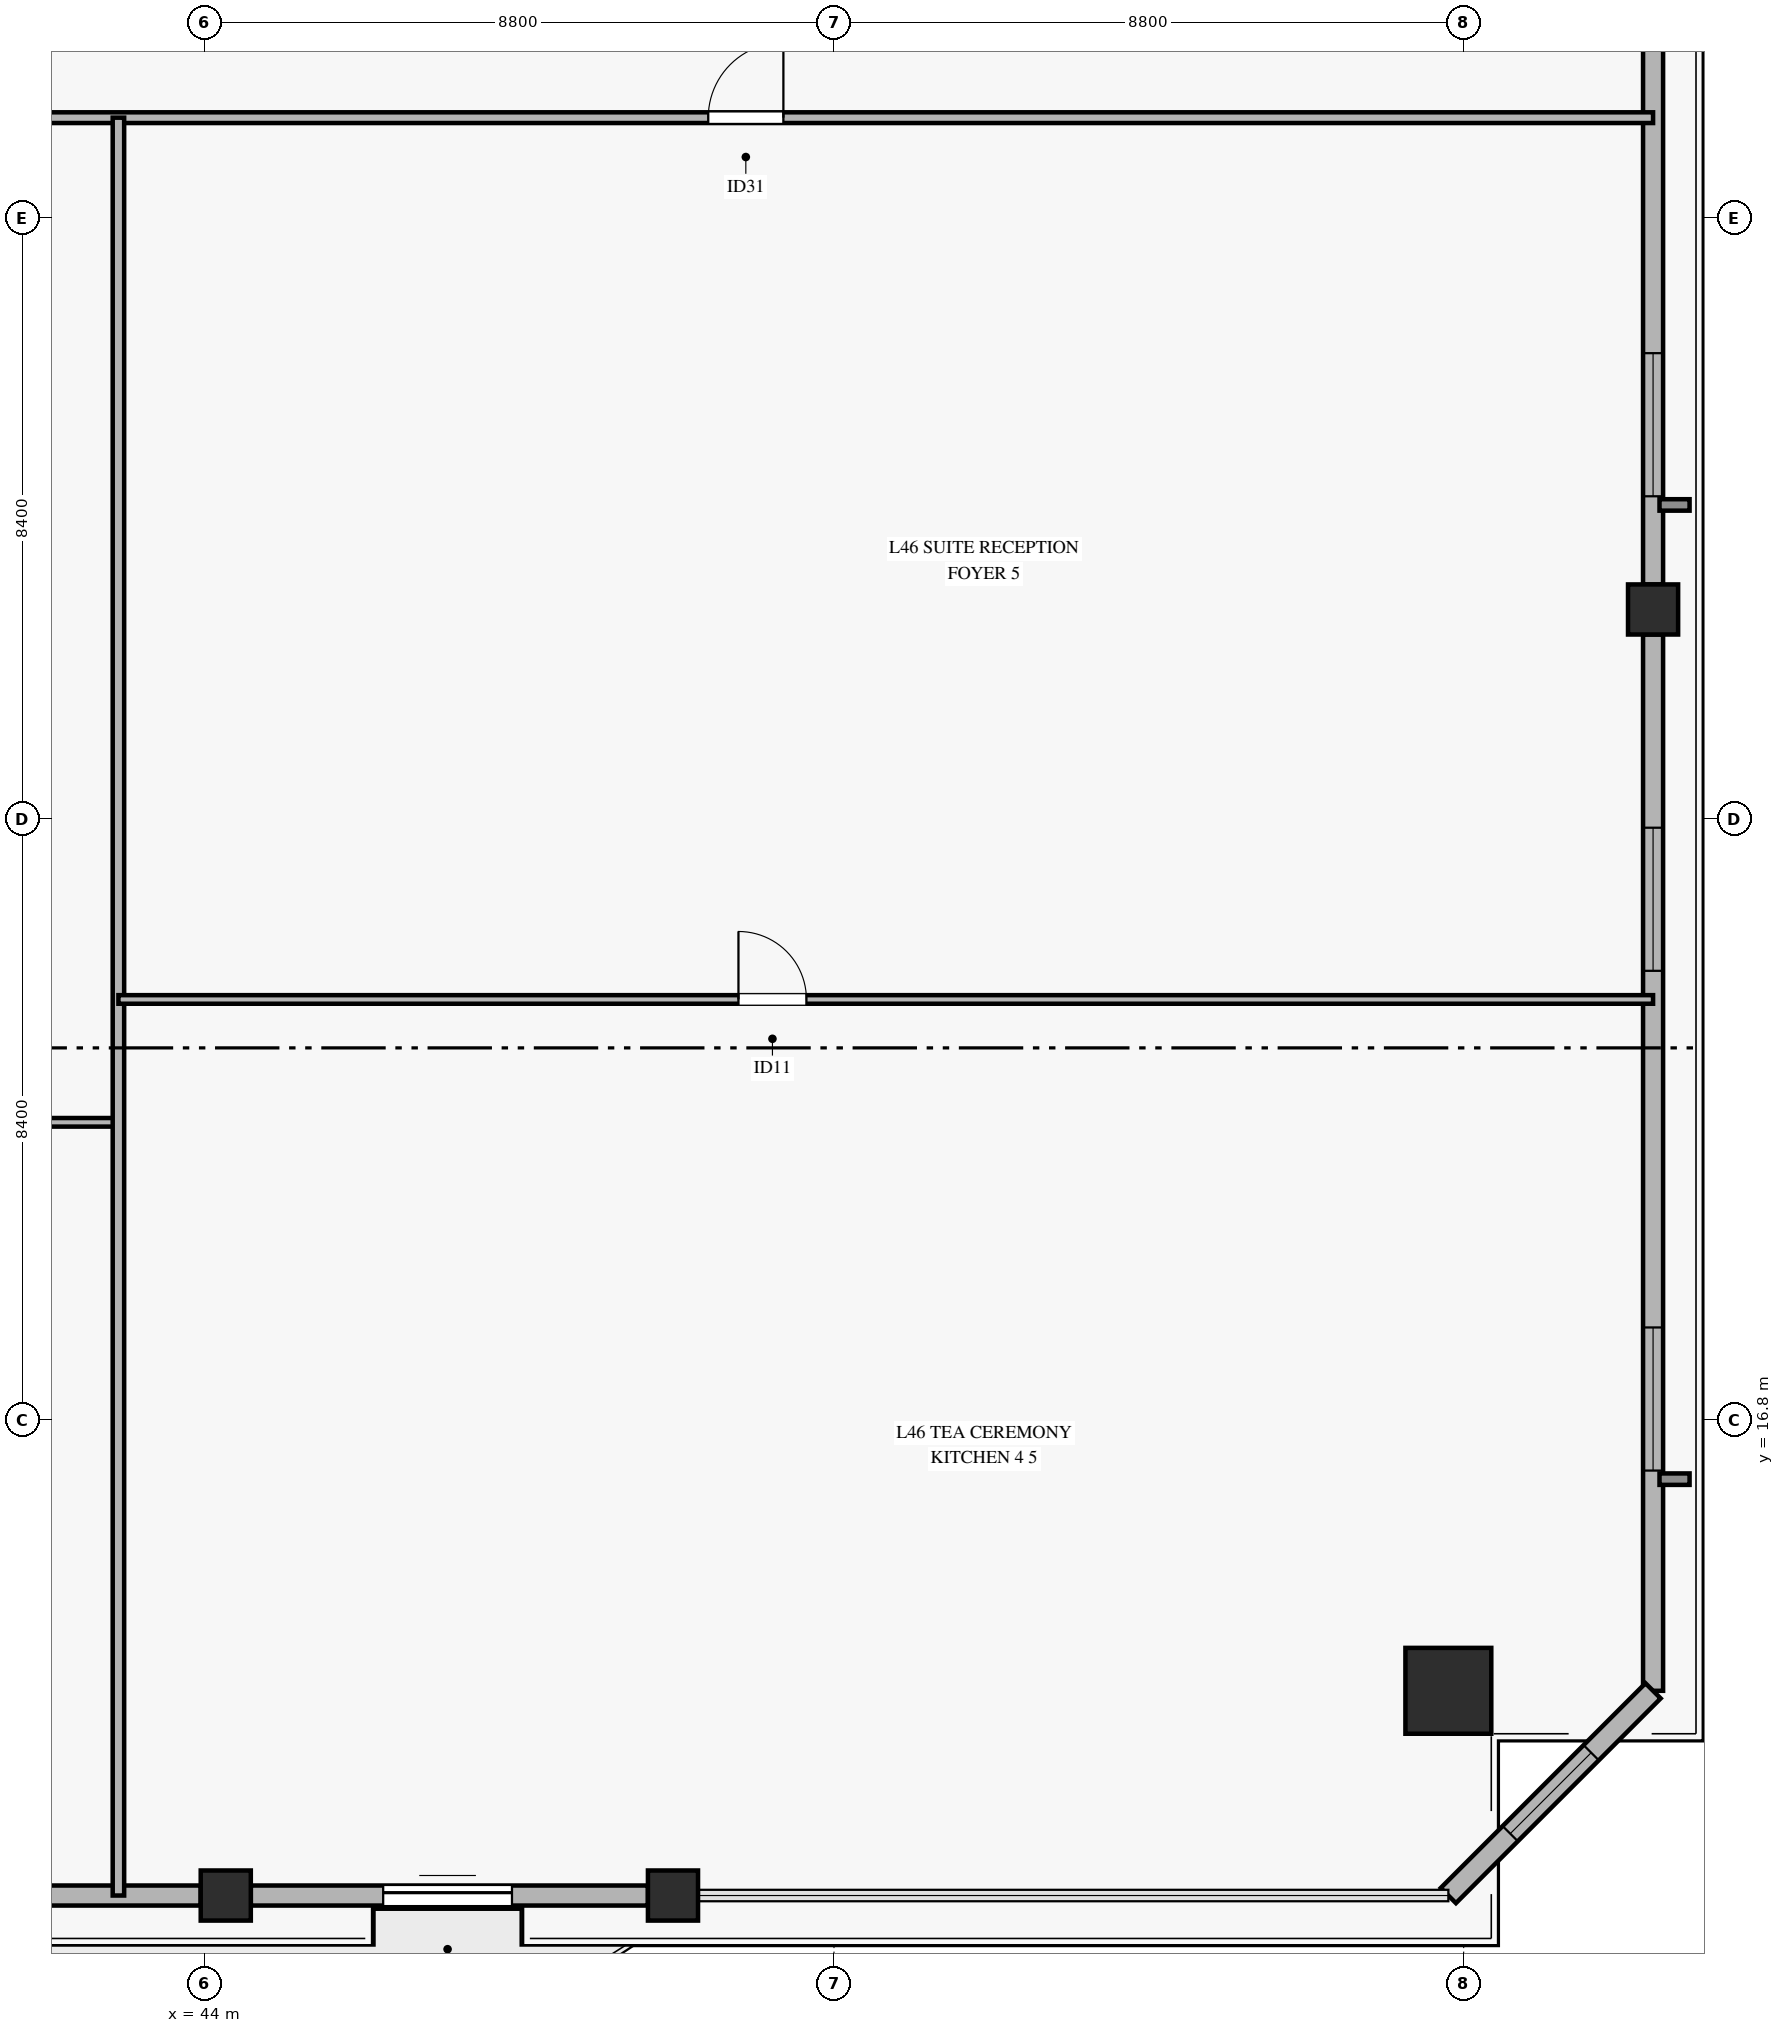
"""IFC4 building model, lengths in metres.
Left out: names, types, materials, properties, quantities, classifications, styles, units other than length and angle.
Written with IfcOpenShell. Run it as: python <this file> out.ifc"""

import sys

from ifc_helpers import new_model, si_unit, direction, frame, frame_2d, origin, origin_2d, place, context, subcontext, project, spatial, rectangle, hollow_rectangle, extrude, source, transform, mapped, element, fill, save


model = new_model("IFC4")
c1 = context("Model", 3, precision=1e-05, world=origin(), true_north=direction((0.0, 1.0)))
c2 = subcontext(c1, "Body", "Model", "MODEL_VIEW")
j1 = project(units=[si_unit("LENGTHUNIT", "METRE"), si_unit("PLANEANGLEUNIT", "RADIAN")], contexts=[c1])
p1 = place(None, origin())
s1 = spatial("IfcSite", under=j1, at=p1, CompositionType="ELEMENT")
p2 = place(p1, origin())
s2 = spatial("IfcBuilding", under=s1, at=p2, CompositionType="ELEMENT")
p3 = place(p2, frame((0.0, 0.0, 184.2)))
s3 = spatial("IfcBuildingStorey", under=s2, at=p3, CompositionType="ELEMENT", Elevation=184.2)
m1 = source(origin(), c2, "Body", "SweptSolid", [
    extrude(hollow_rectangle(XDim=1.2, YDim=1.2, WallThickness=0.055, at=origin_2d()), origin(), (0.0, 0.0, 1.0), 3.27),
])
p4 = place(p3, frame((61.386, 13.015, 0.0), z_axis=(0.0, 0.0, 1.0), x_axis=(1.0, 0.0, 0.0)))
e1 = element("IfcColumn", 1, at=p4, inside=s3, PredefinedType="COLUMN", context=c2, shape_type="MappedRepresentation", body=[
    mapped(m1, transform((0.0, 0.0, 0.0), x_axis=(1.0, 0.0, 0.0), y_axis=(0.0, 1.0, 0.0), z_axis=(0.0, 0.0, 1.0), scale=1.0)),
])
m2 = source(origin(), c2, "Body", "SweptSolid", [
    extrude(hollow_rectangle(XDim=0.7, YDim=0.7, WallThickness=0.032, at=origin_2d()), origin(), (0.0, 0.0, 1.0), 3.27),
])
for number, where, z_axis, x_axis in (
    (2, (44.3, 10.154, 0.0), (0.0, 0.0, 1.0), (1.0, 0.0, 0.0)),
    (3, (50.55, 10.154, 0.0), (0.0, 0.0, 1.0), (1.0, 0.0, 0.0)),
    (4, (64.247, 28.127, 0.0), (0.0, 0.0, 1.0), (1.0, 0.0, 0.0)),
):
    element("IfcColumn", number, at=place(p3, frame(where, z_axis=z_axis, x_axis=x_axis)), inside=s3, PredefinedType="COLUMN", context=c2, shape_type="MappedRepresentation", body=[
        mapped(m2, transform((0.0, 0.0, 0.0), x_axis=(1.0, 0.0, 0.0), y_axis=(0.0, 1.0, 0.0), z_axis=(0.0, 0.0, 1.0), scale=1.0)),
    ])
p5 = place(p3, frame((37.9, 10.154, 0.0), z_axis=(0.0, 0.0, 1.0), x_axis=(1.0, 0.0, 0.0)))
e5 = element("IfcWall", 5, at=p5, inside=s3, PredefinedType="SOLIDWALL", context=c2, shape_type="SweptSolid", body=[
    extrude(rectangle(XDim=6.05, YDim=0.28, at=frame_2d((3.025, 0.0))), origin(), (0.0, 0.0, 1.0), 2.75),
])
p6 = place(p3, frame((44.65, 10.154, 0.0), z_axis=(0.0, 0.0, 1.0), x_axis=(1.0, 0.0, 0.0)))
e6 = element("IfcWall", 6, at=p6, inside=s3, PredefinedType="SOLIDWALL", context=c2, shape_type="SweptSolid", body=[
    extrude(rectangle(XDim=5.55, YDim=0.28, at=frame_2d((2.775, 0.0))), origin(), (0.0, 0.0, 1.0), 2.75),
])
p7 = place(p6, frame((1.85, 0.0, 0.0)))
e7 = element("IfcOpeningElement", 7, at=p7, cuts=e6, PredefinedType="OPENING", context=c2, shape_type="SweptSolid", body=[
    extrude(rectangle(XDim=1.8, YDim=2.25, at=frame_2d((0.9, 1.125))), frame((0.0, 0.15, 0.0), z_axis=(0.0, -1.0, 0.0), x_axis=(1.0, 0.0, 0.0)), (0.0, 0.0, 1.0), 0.3),
])
p8 = place(p3, frame((64.247, 13.015, 0.0), z_axis=(0.0, 0.0, 1.0), x_axis=(0.0, 1.0, 0.0)))
e8 = element("IfcWall", 8, at=p8, inside=s3, PredefinedType="SOLIDWALL", context=c2, shape_type="SweptSolid", body=[
    extrude(rectangle(XDim=14.762, YDim=0.28, at=frame_2d((7.381, 0.0))), origin(), (0.0, 0.0, 1.0), 2.75),
])
p9 = place(p8, frame((3.078, 0.0, 0.45)))
e9 = element("IfcOpeningElement", 9, at=p9, cuts=e8, PredefinedType="OPENING", context=c2, shape_type="SweptSolid", body=[
    extrude(rectangle(XDim=2.0, YDim=2.0, at=frame_2d((1.0, 1.0))), frame((0.0, 0.15, 0.0), z_axis=(0.0, -1.0, 0.0), x_axis=(1.0, 0.0, 0.0)), (0.0, 0.0, 1.0), 0.3),
])
p10 = place(p8, frame((10.062, 0.0, 0.45)))
e10 = element("IfcOpeningElement", 10, at=p10, cuts=e8, PredefinedType="OPENING", context=c2, shape_type="SweptSolid", body=[
    extrude(rectangle(XDim=2.0, YDim=2.0, at=frame_2d((1.0, 1.0))), frame((0.0, 0.15, 0.0), z_axis=(0.0, -1.0, 0.0), x_axis=(1.0, 0.0, 0.0)), (0.0, 0.0, 1.0), 0.3),
])
p11 = place(p3, frame((64.247, 28.477, 0.0), z_axis=(0.0, 0.0, 1.0), x_axis=(0.0, 1.0, 0.0)))
e11 = element("IfcWall", 11, at=p11, inside=s3, PredefinedType="SOLIDWALL", context=c2, shape_type="SweptSolid", body=[
    extrude(rectangle(XDim=14.762, YDim=0.28, at=frame_2d((7.381, 0.0))), origin(), (0.0, 0.0, 1.0), 2.75),
])
p12 = place(p11, frame((1.232, 0.0, 0.45)))
e12 = element("IfcOpeningElement", 12, at=p12, cuts=e11, PredefinedType="OPENING", context=c2, shape_type="SweptSolid", body=[
    extrude(rectangle(XDim=2.0, YDim=2.0, at=frame_2d((1.0, 1.0))), frame((0.0, 0.15, 0.0), z_axis=(0.0, -1.0, 0.0), x_axis=(1.0, 0.0, 0.0)), (0.0, 0.0, 1.0), 0.3),
])
p13 = place(p11, frame((11.487, 0.0, 0.45)))
e13 = element("IfcOpeningElement", 13, at=p13, cuts=e11, PredefinedType="OPENING", context=c2, shape_type="SweptSolid", body=[
    extrude(rectangle(XDim=2.0, YDim=2.0, at=frame_2d((1.0, 1.0))), frame((0.0, 0.15, 0.0), z_axis=(0.0, -1.0, 0.0), x_axis=(1.0, 0.0, 0.0)), (0.0, 0.0, 1.0), 0.3),
])
p14 = place(p3, frame((61.386, 10.154, 0.0), z_axis=(0.0, 0.0, 1.0), x_axis=(0.707136951076, 0.70707661001, 0.0)))
e14 = element("IfcWall", 14, at=p14, inside=s3, PredefinedType="SOLIDWALL", context=c2, shape_type="SweptSolid", body=[
    extrude(rectangle(XDim=4.046, YDim=0.3, at=frame_2d((2.023, 0.0))), origin(), (0.0, 0.0, 1.0), 2.75),
])
p15 = place(p14, frame((1.223, 0.0, 0.45)))
e15 = element("IfcOpeningElement", 15, at=p15, cuts=e14, PredefinedType="OPENING", context=c2, shape_type="SweptSolid", body=[
    extrude(rectangle(XDim=1.6, YDim=2.0, at=frame_2d((0.8, 1.0))), frame((0.0, 0.16, 0.0), z_axis=(0.0, -1.0, 0.0), x_axis=(1.0, 0.0, 0.0)), (0.0, 0.0, 1.0), 0.32),
])
p16 = place(p3, frame((6.154, 35.0, 0.0), z_axis=(0.0, 0.0, 1.0), x_axis=(1.0, 0.0, 0.0)))
e16 = element("IfcWall", 16, at=p16, inside=s3, PredefinedType="PARTITIONING", context=c2, shape_type="SweptSolid", body=[
    extrude(rectangle(XDim=58.093, YDim=0.15, at=frame_2d((29.046, 0.0))), origin(), (0.0, 0.0, 1.0), 2.455),
])
p17 = place(p16, frame((6.695, 0.0, 0.0)))
e17 = element("IfcOpeningElement", 17, at=p17, cuts=e16, PredefinedType="OPENING", context=c2, shape_type="SweptSolid", body=[
    extrude(rectangle(XDim=1.05, YDim=2.15, at=frame_2d((0.525, 1.075))), frame((0.0, 0.085, 0.0), z_axis=(0.0, -1.0, 0.0), x_axis=(1.0, 0.0, 0.0)), (0.0, 0.0, 1.0), 0.17),
])
p18 = place(p16, frame((19.523, 0.0, 0.0)))
e18 = element("IfcOpeningElement", 18, at=p18, cuts=e16, PredefinedType="OPENING", context=c2, shape_type="SweptSolid", body=[
    extrude(rectangle(XDim=1.05, YDim=2.15, at=frame_2d((0.525, 1.075))), frame((0.0, 0.085, 0.0), z_axis=(0.0, -1.0, 0.0), x_axis=(1.0, 0.0, 0.0)), (0.0, 0.0, 1.0), 0.17),
])
p19 = place(p16, frame((26.123, 0.0, 0.0)))
e19 = element("IfcOpeningElement", 19, at=p19, cuts=e16, PredefinedType="OPENING", context=c2, shape_type="SweptSolid", body=[
    extrude(rectangle(XDim=1.05, YDim=2.15, at=frame_2d((0.525, 1.075))), frame((0.0, 0.085, 0.0), z_axis=(0.0, -1.0, 0.0), x_axis=(1.0, 0.0, 0.0)), (0.0, 0.0, 1.0), 0.17),
])
p20 = place(p16, frame((32.616, 0.0, 0.0)))
e20 = element("IfcOpeningElement", 20, at=p20, cuts=e16, PredefinedType="OPENING", context=c2, shape_type="SweptSolid", body=[
    extrude(rectangle(XDim=1.05, YDim=2.15, at=frame_2d((0.525, 1.075))), frame((0.0, 0.085, 0.0), z_axis=(0.0, -1.0, 0.0), x_axis=(1.0, 0.0, 0.0)), (0.0, 0.0, 1.0), 0.17),
])
p21 = place(p16, frame((44.889, 0.0, 0.0)))
e21 = element("IfcOpeningElement", 21, at=p21, cuts=e16, PredefinedType="OPENING", context=c2, shape_type="SweptSolid", body=[
    extrude(rectangle(XDim=1.05, YDim=2.15, at=frame_2d((0.525, 1.075))), frame((0.0, 0.085, 0.0), z_axis=(0.0, -1.0, 0.0), x_axis=(1.0, 0.0, 0.0)), (0.0, 0.0, 1.0), 0.17),
])
p22 = place(p3, frame((36.2, 20.96, 0.0), z_axis=(0.0, 0.0, 1.0), x_axis=(1.0, 0.0, 0.0)))
e22 = element("IfcWall", 22, at=p22, inside=s3, PredefinedType="PARTITIONING", context=c2, shape_type="SweptSolid", body=[
    extrude(rectangle(XDim=6.6, YDim=0.12, at=frame_2d((3.3, 0.0))), origin(), (0.0, 0.0, 1.0), 2.455),
])
p23 = place(p22, frame((3.025, 0.0, 0.0)))
e23 = element("IfcOpeningElement", 23, at=p23, cuts=e22, PredefinedType="OPENING", context=c2, shape_type="SweptSolid", body=[
    extrude(rectangle(XDim=0.95, YDim=2.1, at=frame_2d((0.475, 1.05))), frame((0.0, 0.07, 0.0), z_axis=(0.0, -1.0, 0.0), x_axis=(1.0, 0.0, 0.0)), (0.0, 0.0, 1.0), 0.14),
])
p24 = place(p3, frame((42.8, 10.154, 0.0), z_axis=(0.0, 0.0, 1.0), x_axis=(0.0, 1.0, 0.0)))
e24 = element("IfcWall", 24, at=p24, inside=s3, PredefinedType="PARTITIONING", context=c2, shape_type="SweptSolid", body=[
    extrude(rectangle(XDim=24.846, YDim=0.16, at=frame_2d((12.423, 0.0))), origin(), (0.0, 0.0, 1.0), 2.755),
])
p25 = place(p3, frame((42.8, 22.677, 0.0), z_axis=(0.0, 0.0, 1.0), x_axis=(1.0, 0.0, 0.0)))
e25 = element("IfcWall", 25, at=p25, inside=s3, PredefinedType="PARTITIONING", context=c2, shape_type="SweptSolid", body=[
    extrude(rectangle(XDim=21.447, YDim=0.12, at=frame_2d((10.724, 0.0))), origin(), (0.0, 0.0, 1.0), 2.455),
])
p26 = place(p25, frame((8.665, 0.0, 0.0)))
e26 = element("IfcOpeningElement", 26, at=p26, cuts=e25, PredefinedType="OPENING", context=c2, shape_type="SweptSolid", body=[
    extrude(rectangle(XDim=0.95, YDim=2.1, at=frame_2d((0.475, 1.05))), frame((0.0, 0.07, 0.0), z_axis=(0.0, -1.0, 0.0), x_axis=(1.0, 0.0, 0.0)), (0.0, 0.0, 1.0), 0.14),
])
m3 = source(origin(), c2, "Body", "SweptSolid", [
    extrude(rectangle(XDim=1.8, YDim=2.25, at=frame_2d((0.9, 1.125))), frame((0.0, 0.025, 0.0), z_axis=(0.0, -1.0, 0.0), x_axis=(1.0, 0.0, 0.0)), (0.0, 0.0, 1.0), 0.05),
])
p27 = place(p7, origin())
e27 = element("IfcDoor", 27, at=p27, inside=s3, OperationType="SLIDING_TO_LEFT", PredefinedType="DOOR", context=c2, shape_type="MappedRepresentation", body=[
    mapped(m3, transform((0.0, 0.0, 0.0), x_axis=(1.0, 0.0, 0.0), y_axis=(0.0, 1.0, 0.0), z_axis=(0.0, 0.0, 1.0), scale=1.0)),
])
fill(e7, e27)
m4 = source(origin(), c2, "Body", "SweptSolid", [
    extrude(rectangle(XDim=2.0, YDim=2.0, at=frame_2d((1.0, 1.0))), frame((0.0, 0.03, 0.0), z_axis=(0.0, -1.0, 0.0), x_axis=(1.0, 0.0, 0.0)), (0.0, 0.0, 1.0), 0.06),
])
p28 = place(p9, origin())
e28 = element("IfcWindow", 28, at=p28, inside=s3, PartitioningType="SINGLE_PANEL", PredefinedType="WINDOW", context=c2, shape_type="MappedRepresentation", body=[
    mapped(m4, transform((0.0, 0.0, 0.0), x_axis=(1.0, 0.0, 0.0), y_axis=(0.0, 1.0, 0.0), z_axis=(0.0, 0.0, 1.0), scale=1.0)),
])
fill(e9, e28)
p29 = place(p10, origin())
e29 = element("IfcWindow", 29, at=p29, inside=s3, PartitioningType="SINGLE_PANEL", PredefinedType="WINDOW", context=c2, shape_type="MappedRepresentation", body=[
    mapped(m4, transform((0.0, 0.0, 0.0), x_axis=(1.0, 0.0, 0.0), y_axis=(0.0, 1.0, 0.0), z_axis=(0.0, 0.0, 1.0), scale=1.0)),
])
fill(e10, e29)
p30 = place(p12, origin())
e30 = element("IfcWindow", 30, at=p30, inside=s3, PartitioningType="SINGLE_PANEL", PredefinedType="WINDOW", context=c2, shape_type="MappedRepresentation", body=[
    mapped(m4, transform((0.0, 0.0, 0.0), x_axis=(1.0, 0.0, 0.0), y_axis=(0.0, 1.0, 0.0), z_axis=(0.0, 0.0, 1.0), scale=1.0)),
])
fill(e12, e30)
m5 = source(origin(), c2, "Body", "SweptSolid", [
    extrude(rectangle(XDim=1.6, YDim=2.0, at=frame_2d((0.8, 1.0))), frame((0.0, 0.03, 0.0), z_axis=(0.0, -1.0, 0.0), x_axis=(1.0, 0.0, 0.0)), (0.0, 0.0, 1.0), 0.06),
])
p31 = place(p15, origin())
e31 = element("IfcWindow", 31, at=p31, inside=s3, PartitioningType="SINGLE_PANEL", PredefinedType="WINDOW", context=c2, shape_type="MappedRepresentation", body=[
    mapped(m5, transform((0.0, 0.0, 0.0), x_axis=(1.0, 0.0, 0.0), y_axis=(0.0, 1.0, 0.0), z_axis=(0.0, 0.0, 1.0), scale=1.0)),
])
fill(e15, e31)
m6 = source(origin(), c2, "Body", "SweptSolid", [
    extrude(rectangle(XDim=1.05, YDim=2.15, at=frame_2d((0.525, 1.075))), frame((0.0, 0.025, 0.0), z_axis=(0.0, -1.0, 0.0), x_axis=(1.0, 0.0, 0.0)), (0.0, 0.0, 1.0), 0.05),
])
p32 = place(p21, origin())
e32 = element("IfcDoor", 32, at=p32, inside=s3, OperationType="SINGLE_SWING_RIGHT", PredefinedType="DOOR", context=c2, shape_type="MappedRepresentation", body=[
    mapped(m6, transform((0.0, 0.0, 0.0), x_axis=(1.0, 0.0, 0.0), y_axis=(0.0, 1.0, 0.0), z_axis=(0.0, 0.0, 1.0), scale=1.0)),
])
fill(e21, e32)
m7 = source(origin(), c2, "Body", "SweptSolid", [
    extrude(rectangle(XDim=0.95, YDim=2.1, at=frame_2d((0.475, 1.05))), frame((0.0, 0.025, 0.0), z_axis=(0.0, -1.0, 0.0), x_axis=(1.0, 0.0, 0.0)), (0.0, 0.0, 1.0), 0.05),
])
p33 = place(p26, origin())
e33 = element("IfcDoor", 33, at=p33, inside=s3, OperationType="SINGLE_SWING_LEFT", PredefinedType="DOOR", context=c2, shape_type="MappedRepresentation", body=[
    mapped(m7, transform((0.0, 0.0, 0.0), x_axis=(1.0, 0.0, 0.0), y_axis=(0.0, 1.0, 0.0), z_axis=(0.0, 0.0, 1.0), scale=1.0)),
])
fill(e26, e33)
save(model, sys.argv[1])
